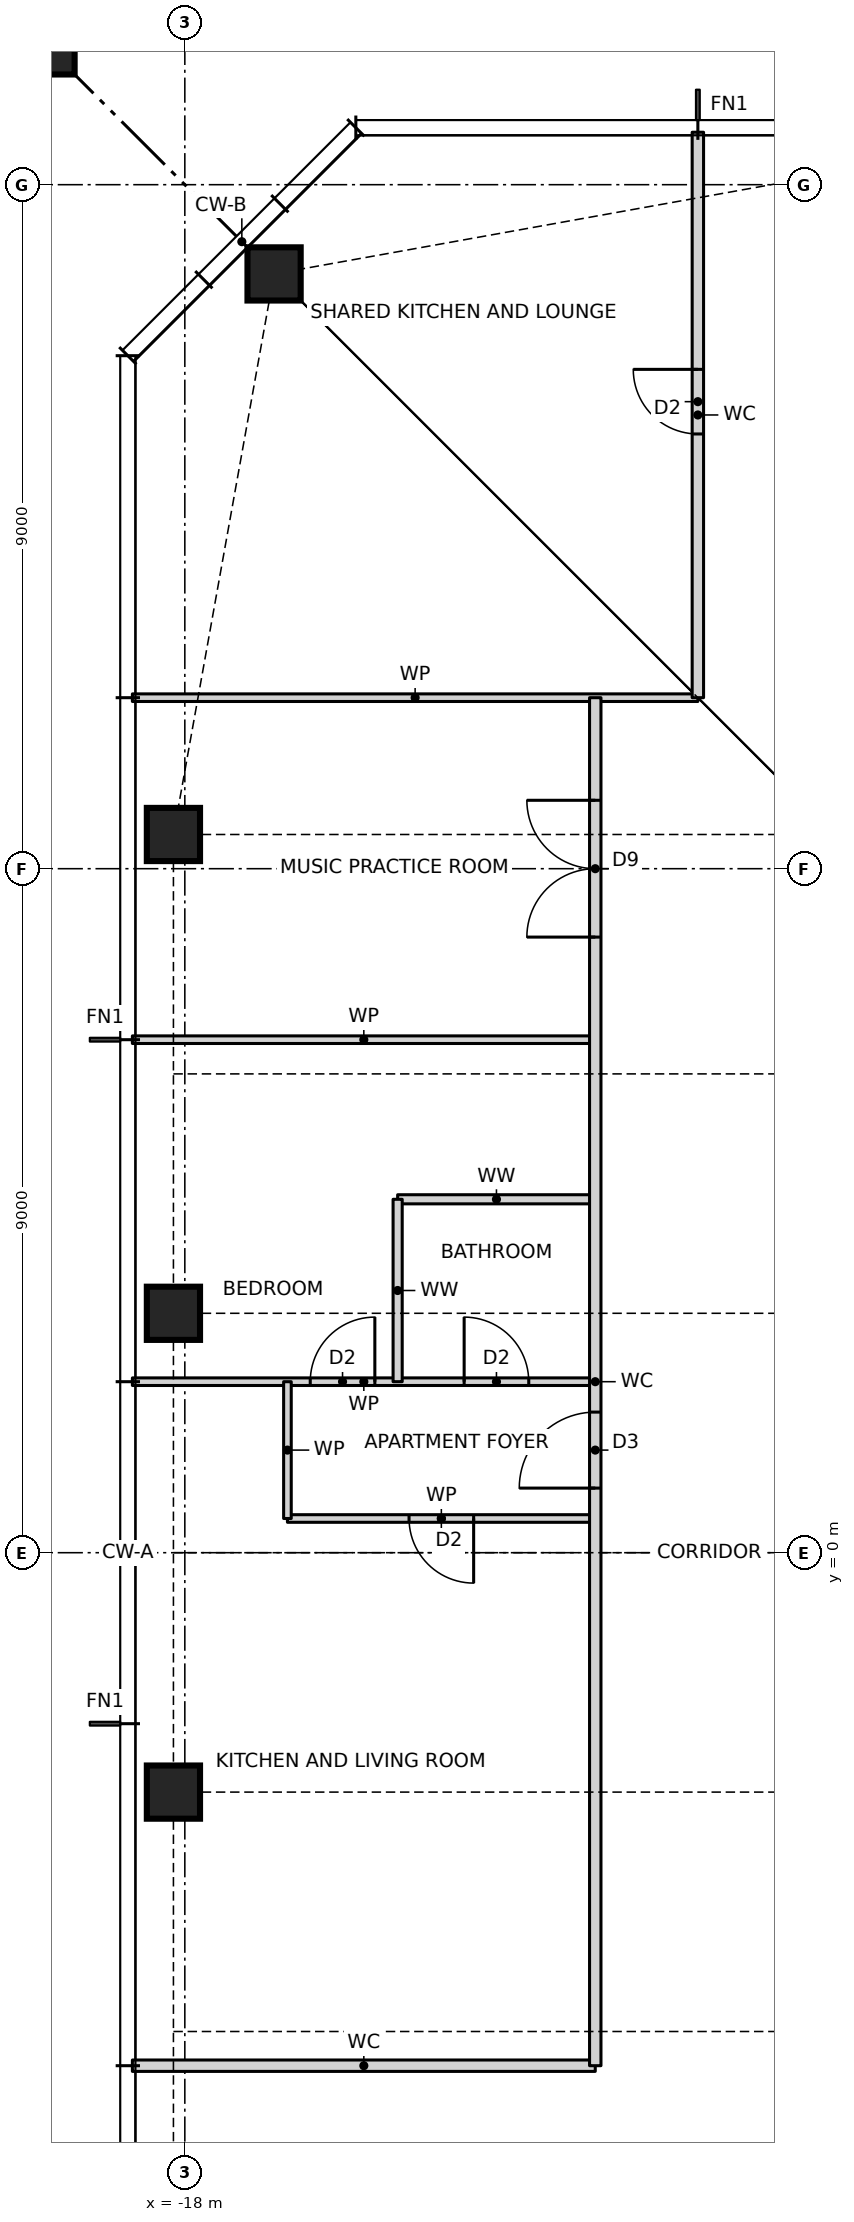
"""IFC4 building model, lengths in metres.
Left out: names, types, materials, properties, quantities, classifications, styles, units other than length and angle.
Written with IfcOpenShell. Run it as: python <this file> out.ifc"""

import sys

from ifc_helpers import new_model, si_unit, direction, frame, frame_2d, origin, origin_2d, place, context, subcontext, project, spatial, rectangle, hollow_rectangle, i_section, extrude, element, fill, save


model = new_model("IFC4")
c1 = context("Model", 3, precision=1e-05, world=origin(), true_north=direction((0.0, 1.0)))
c2 = subcontext(c1, "Body", "Model", "MODEL_VIEW")
j1 = project(units=[si_unit("LENGTHUNIT", "METRE"), si_unit("PLANEANGLEUNIT", "RADIAN")], contexts=[c1])
p1 = place(None, origin())
s1 = spatial("IfcSite", under=j1, at=p1, CompositionType="ELEMENT")
p2 = place(p1, origin())
s2 = spatial("IfcBuilding", under=s1, at=p2, CompositionType="ELEMENT")
p3 = place(p2, frame((0.0, 0.0, 191.5)))
s3 = spatial("IfcBuildingStorey", under=s2, at=p3, CompositionType="ELEMENT", Elevation=191.5)
for number, where, z_axis, x_axis in (
    (1, (-16.826, 16.826, 0.0), (0.0, 0.0, 1.0), (1.0, 0.0, 0.0)),
    (2, (-18.15, 9.45, 0.0), (0.0, 0.0, 1.0), (1.0, 0.0, 0.0)),
    (3, (-18.15, 3.15, 0.0), (0.0, 0.0, 1.0), (1.0, 0.0, 0.0)),
    (4, (-18.15, -3.15, 0.0), (0.0, 0.0, 1.0), (1.0, 0.0, 0.0)),
):
    element("IfcColumn", number, at=place(p3, frame(where, z_axis=z_axis, x_axis=x_axis)), inside=s3, PredefinedType="COLUMN", context=c2, shape_type="SweptSolid", body=[
        extrude(hollow_rectangle(XDim=0.7, YDim=0.7, WallThickness=0.06, at=origin_2d()), origin(), (0.0, 0.0, 1.0), 3.5),
    ])
p4 = place(p3, frame((-21.65, 21.65, 0.0), z_axis=(0.0, 0.0, 1.0), x_axis=(1.0, 0.0, 0.0)))
e5 = element("IfcColumn", 5, at=p4, inside=s3, PredefinedType="COLUMN", context=c2, shape_type="SweptSolid", body=[
    extrude(rectangle(XDim=4.4, YDim=4.4, at=origin_2d()), origin(), (0.0, 0.0, 1.0), 3.5),
    extrude(i_section(OverallWidth=0.478, OverallDepth=0.599, WebThickness=0.1, FlangeThickness=0.14, at=origin_2d()), origin(), (0.0, 0.0, 1.0), 3.5),
])
p5 = place(p3, frame((-18.69, -6.75, 0.0), z_axis=(0.0, 0.0, 1.0), x_axis=(1.0, 0.0, 0.0)))
e6 = element("IfcWall", 6, at=p5, inside=s3, PredefinedType="PARTITIONING", context=c2, shape_type="SweptSolid", body=[
    extrude(rectangle(XDim=6.09, YDim=0.15, at=frame_2d((3.045, 0.0))), origin(), (0.0, 0.0, 1.0), 3.27),
])
p6 = place(p3, frame((-16.65, 0.45, 0.0), z_axis=(0.0, 0.0, 1.0), x_axis=(1.0, 0.0, 0.0)))
e7 = element("IfcWall", 7, at=p6, inside=s3, PredefinedType="PARTITIONING", context=c2, shape_type="SweptSolid", body=[
    extrude(rectangle(XDim=4.05, YDim=0.1, at=frame_2d((2.025, 0.0))), origin(), (0.0, 0.0, 1.0), 3.27),
])
p7 = place(p6, frame((1.6, 0.0, 0.0)))
e8 = element("IfcOpeningElement", 8, at=p7, cuts=e7, PredefinedType="OPENING", context=c2, shape_type="SweptSolid", body=[
    extrude(rectangle(XDim=0.85, YDim=2.1, at=frame_2d((0.425, 1.05))), frame((0.0, 0.06, 0.0), z_axis=(0.0, -1.0, 0.0), x_axis=(1.0, 0.0, 0.0)), (0.0, 0.0, 1.0), 0.12),
])
p8 = place(p3, frame((-18.69, 2.25, 0.0), z_axis=(0.0, 0.0, 1.0), x_axis=(1.0, 0.0, 0.0)))
e9 = element("IfcWall", 9, at=p8, inside=s3, PredefinedType="PARTITIONING", context=c2, shape_type="SweptSolid", body=[
    extrude(rectangle(XDim=6.09, YDim=0.1, at=frame_2d((3.045, 0.0))), origin(), (0.0, 0.0, 1.0), 3.27),
])
p9 = place(p8, frame((2.34, 0.0, 0.0)))
e10 = element("IfcOpeningElement", 10, at=p9, cuts=e9, PredefinedType="OPENING", context=c2, shape_type="SweptSolid", body=[
    extrude(rectangle(XDim=0.85, YDim=2.1, at=frame_2d((0.425, 1.05))), frame((0.0, 0.06, 0.0), z_axis=(0.0, -1.0, 0.0), x_axis=(1.0, 0.0, 0.0)), (0.0, 0.0, 1.0), 0.12),
])
p10 = place(p8, frame((4.365, 0.0, 0.0)))
e11 = element("IfcOpeningElement", 11, at=p10, cuts=e9, PredefinedType="OPENING", context=c2, shape_type="SweptSolid", body=[
    extrude(rectangle(XDim=0.85, YDim=2.1, at=frame_2d((0.425, 1.05))), frame((0.0, 0.06, 0.0), z_axis=(0.0, -1.0, 0.0), x_axis=(1.0, 0.0, 0.0)), (0.0, 0.0, 1.0), 0.12),
])
p11 = place(p3, frame((-15.2, 4.65, 0.0), z_axis=(0.0, 0.0, 1.0), x_axis=(1.0, 0.0, 0.0)))
e12 = element("IfcWall", 12, at=p11, inside=s3, PredefinedType="PARTITIONING", context=c2, shape_type="SweptSolid", body=[
    extrude(rectangle(XDim=2.6, YDim=0.12, at=frame_2d((1.3, 0.0))), origin(), (0.0, 0.0, 1.0), 3.27),
])
p12 = place(p3, frame((-18.69, 6.75, 0.0), z_axis=(0.0, 0.0, 1.0), x_axis=(1.0, 0.0, 0.0)))
e13 = element("IfcWall", 13, at=p12, inside=s3, PredefinedType="PARTITIONING", context=c2, shape_type="SweptSolid", body=[
    extrude(rectangle(XDim=6.09, YDim=0.1, at=frame_2d((3.045, 0.0))), origin(), (0.0, 0.0, 1.0), 3.27),
])
p13 = place(p3, frame((-18.69, 11.25, 0.0), z_axis=(0.0, 0.0, 1.0), x_axis=(1.0, 0.0, 0.0)))
e14 = element("IfcWall", 14, at=p13, inside=s3, PredefinedType="PARTITIONING", context=c2, shape_type="SweptSolid", body=[
    extrude(rectangle(XDim=7.44, YDim=0.1, at=frame_2d((3.72, 0.0))), origin(), (0.0, 0.0, 1.0), 3.27),
])
p14 = place(p3, frame((-11.25, 11.25, 0.0), z_axis=(0.0, 0.0, 1.0), x_axis=(0.0, 1.0, 0.0)))
e15 = element("IfcWall", 15, at=p14, inside=s3, PredefinedType="PARTITIONING", context=c2, shape_type="SweptSolid", body=[
    extrude(rectangle(XDim=7.44, YDim=0.15, at=frame_2d((3.72, 0.0))), origin(), (0.0, 0.0, 1.0), 3.27),
])
p15 = place(p14, frame((3.47, 0.0, 0.0)))
e16 = element("IfcOpeningElement", 16, at=p15, cuts=e15, PredefinedType="OPENING", context=c2, shape_type="SweptSolid", body=[
    extrude(rectangle(XDim=0.85, YDim=2.1, at=frame_2d((0.425, 1.05))), frame((0.0, 0.085, 0.0), z_axis=(0.0, -1.0, 0.0), x_axis=(1.0, 0.0, 0.0)), (0.0, 0.0, 1.0), 0.17),
])
p16 = place(p3, frame((-12.6, -6.75, 0.0), z_axis=(0.0, 0.0, 1.0), x_axis=(0.0, 1.0, 0.0)))
e17 = element("IfcWall", 17, at=p16, inside=s3, PredefinedType="PARTITIONING", context=c2, shape_type="SweptSolid", body=[
    extrude(rectangle(XDim=18.0, YDim=0.15, at=frame_2d((9.0, 0.0))), origin(), (0.0, 0.0, 1.0), 3.27),
])
p17 = place(p16, frame((14.85, 0.0, 0.0)))
e18 = element("IfcOpeningElement", 18, at=p17, cuts=e17, PredefinedType="OPENING", context=c2, shape_type="SweptSolid", body=[
    extrude(rectangle(XDim=1.8, YDim=2.1, at=frame_2d((0.9, 1.05))), frame((0.0, 0.085, 0.0), z_axis=(0.0, -1.0, 0.0), x_axis=(1.0, 0.0, 0.0)), (0.0, 0.0, 1.0), 0.17),
])
p18 = place(p16, frame((7.6, 0.0, 0.0)))
e19 = element("IfcOpeningElement", 19, at=p18, cuts=e17, PredefinedType="OPENING", context=c2, shape_type="SweptSolid", body=[
    extrude(rectangle(XDim=1.0, YDim=2.1, at=frame_2d((0.5, 1.05))), frame((0.0, 0.085, 0.0), z_axis=(0.0, -1.0, 0.0), x_axis=(1.0, 0.0, 0.0)), (0.0, 0.0, 1.0), 0.17),
])
p19 = place(p3, frame((-15.2, 2.25, 0.0), z_axis=(0.0, 0.0, 1.0), x_axis=(0.0, 1.0, 0.0)))
e20 = element("IfcWall", 20, at=p19, inside=s3, PredefinedType="PARTITIONING", context=c2, shape_type="SweptSolid", body=[
    extrude(rectangle(XDim=2.4, YDim=0.12, at=frame_2d((1.2, 0.0))), origin(), (0.0, 0.0, 1.0), 3.27),
])
p20 = place(p3, frame((-16.65, 0.45, 0.0), z_axis=(0.0, 0.0, 1.0), x_axis=(0.0, 1.0, 0.0)))
e21 = element("IfcWall", 21, at=p20, inside=s3, PredefinedType="PARTITIONING", context=c2, shape_type="SweptSolid", body=[
    extrude(rectangle(XDim=1.8, YDim=0.1, at=frame_2d((0.9, 0.0))), origin(), (0.0, 0.0, 1.0), 3.27),
])
p21 = place(p17, origin())
e22 = element("IfcDoor", 22, at=p21, inside=s3, OperationType="DOUBLE_DOOR_SINGLE_SWING", PredefinedType="DOOR", context=c2, shape_type="SweptSolid", body=[
    extrude(rectangle(XDim=1.8, YDim=2.1, at=frame_2d((0.9, 1.05))), frame((0.0, 0.025, 0.0), z_axis=(0.0, -1.0, 0.0), x_axis=(1.0, 0.0, 0.0)), (0.0, 0.0, 1.0), 0.05),
])
fill(e18, e22)
p22 = place(p18, origin())
e23 = element("IfcDoor", 23, at=p22, inside=s3, OperationType="SINGLE_SWING_LEFT", PredefinedType="DOOR", context=c2, shape_type="SweptSolid", body=[
    extrude(rectangle(XDim=1.0, YDim=2.1, at=frame_2d((0.5, 1.05))), frame((0.0, 0.025, 0.0), z_axis=(0.0, -1.0, 0.0), x_axis=(1.0, 0.0, 0.0)), (0.0, 0.0, 1.0), 0.05),
])
fill(e19, e23)
p23 = place(p7, frame((0.85, 0.0, 0.0), z_axis=(0.0, 0.0, 1.0), x_axis=(-1.0, 0.0, 0.0)))
e24 = element("IfcDoor", 24, at=p23, inside=s3, OperationType="SINGLE_SWING_LEFT", PredefinedType="DOOR", context=c2, shape_type="SweptSolid", body=[
    extrude(rectangle(XDim=0.85, YDim=2.1, at=frame_2d((0.425, 1.05))), frame((0.0, 0.025, 0.0), z_axis=(0.0, -1.0, 0.0), x_axis=(1.0, 0.0, 0.0)), (0.0, 0.0, 1.0), 0.05),
])
fill(e8, e24)
p24 = place(p9, origin())
e25 = element("IfcDoor", 25, at=p24, inside=s3, OperationType="SINGLE_SWING_RIGHT", PredefinedType="DOOR", context=c2, shape_type="SweptSolid", body=[
    extrude(rectangle(XDim=0.85, YDim=2.1, at=frame_2d((0.425, 1.05))), frame((0.0, 0.025, 0.0), z_axis=(0.0, -1.0, 0.0), x_axis=(1.0, 0.0, 0.0)), (0.0, 0.0, 1.0), 0.05),
])
fill(e10, e25)
p25 = place(p10, origin())
e26 = element("IfcDoor", 26, at=p25, inside=s3, OperationType="SINGLE_SWING_LEFT", PredefinedType="DOOR", context=c2, shape_type="SweptSolid", body=[
    extrude(rectangle(XDim=0.85, YDim=2.1, at=frame_2d((0.425, 1.05))), frame((0.0, 0.025, 0.0), z_axis=(0.0, -1.0, 0.0), x_axis=(1.0, 0.0, 0.0)), (0.0, 0.0, 1.0), 0.05),
])
fill(e11, e26)
p26 = place(p15, origin())
e27 = element("IfcDoor", 27, at=p26, inside=s3, OperationType="SINGLE_SWING_RIGHT", PredefinedType="DOOR", context=c2, shape_type="SweptSolid", body=[
    extrude(rectangle(XDim=0.85, YDim=2.1, at=frame_2d((0.425, 1.05))), frame((0.0, 0.025, 0.0), z_axis=(0.0, -1.0, 0.0), x_axis=(1.0, 0.0, 0.0)), (0.0, 0.0, 1.0), 0.05),
])
fill(e16, e27)
save(model, sys.argv[1])
